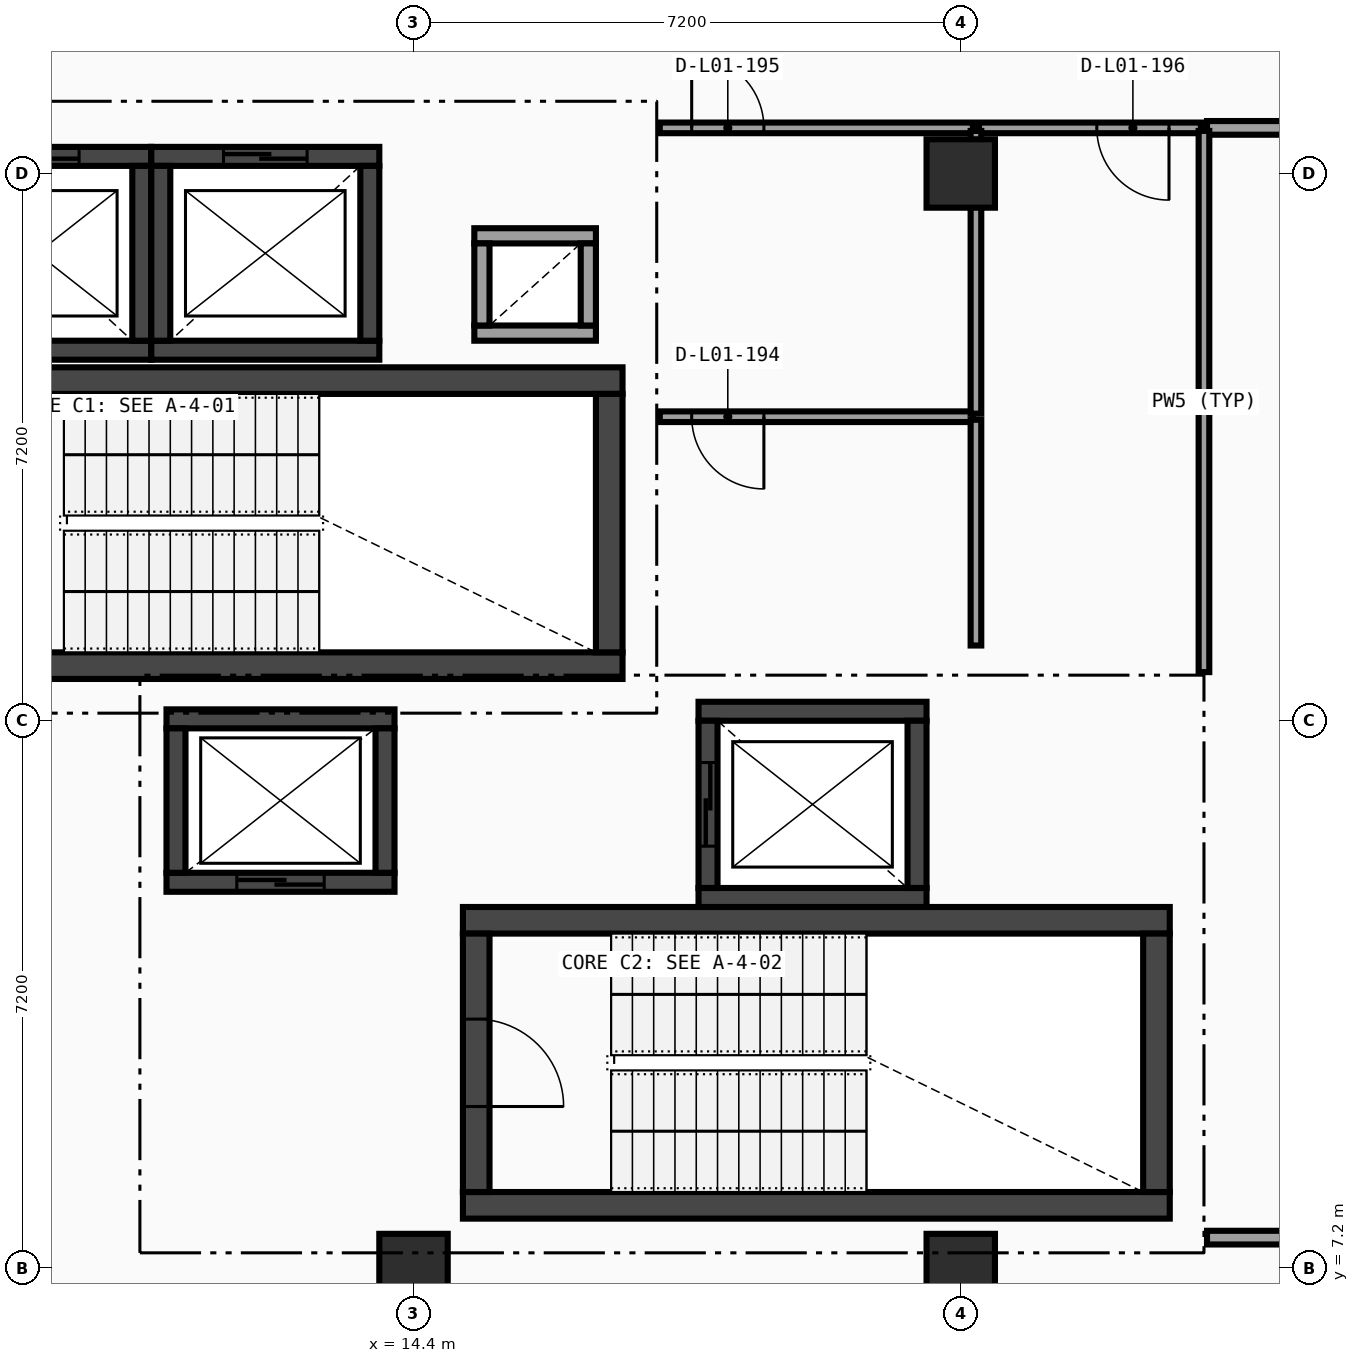
"""IFC4 building model, lengths in metres.
Left out: names, types, materials, properties, quantities, classifications, styles, units other than length and angle.
Written with IfcOpenShell. Run it as: python <this file> out.ifc"""

import sys

from ifc_helpers import new_model, si_unit, direction, frame, frame_2d, origin, origin_2d, place, context, subcontext, project, spatial, rectangle, extrude, element, fill, save


model = new_model("IFC4")
c1 = context("Model", 3, precision=1e-05, world=origin(), true_north=direction((0.0, 1.0)))
c2 = subcontext(c1, "Body", "Model", "MODEL_VIEW")
j1 = project(units=[si_unit("LENGTHUNIT", "METRE"), si_unit("PLANEANGLEUNIT", "RADIAN")], contexts=[c1])
p1 = place(None, origin())
s1 = spatial("IfcSite", under=j1, at=p1, CompositionType="ELEMENT")
p2 = place(p1, origin())
s2 = spatial("IfcBuilding", under=s1, at=p2, CompositionType="ELEMENT")
p3 = place(p2, frame((0.0, 0.0, 5.4)))
s3 = spatial("IfcBuildingStorey", under=s2, at=p3, CompositionType="ELEMENT", Elevation=5.4)
for number, where, z_axis, x_axis in (
    (1, (14.4, 7.2, 0.0), (0.0, 0.0, 1.0), (1.0, 0.0, 0.0)),
    (2, (21.6, 7.2, 0.0), (0.0, 0.0, 1.0), (1.0, 0.0, 0.0)),
    (3, (21.6, 21.6, 0.0), (0.0, 0.0, 1.0), (1.0, 0.0, 0.0)),
):
    element("IfcColumn", number, at=place(p3, frame(where, z_axis=z_axis, x_axis=x_axis)), inside=s3, PredefinedType="COLUMN", context=c2, shape_type="SweptSolid", body=[
        extrude(rectangle(XDim=0.9, YDim=0.9, at=origin_2d()), origin(), (0.0, 0.0, 1.0), 4.8),
    ])
for number, where, z_axis, x_axis in (
    (4, (7.85, 15.125, 0.0), (0.0, 0.0, 1.0), (1.0, 0.0, 0.0)),
    (5, (17.15, 18.875, 0.0), (0.0, 0.0, 1.0), (-1.0, 0.0, 0.0)),
):
    element("IfcWall", number, at=place(p3, frame(where, z_axis=z_axis, x_axis=x_axis)), inside=s3, PredefinedType="SHEAR", context=c2, shape_type="SweptSolid", body=[
        extrude(rectangle(XDim=9.3, YDim=0.35, at=frame_2d((4.65, 0.0))), origin(), (0.0, 0.0, 1.0), 4.52),
    ])
p4 = place(p3, frame((16.975, 15.3, 0.0), z_axis=(0.0, 0.0, 1.0), x_axis=(0.0, 1.0, 0.0)))
e6 = element("IfcWall", 6, at=p4, inside=s3, PredefinedType="SHEAR", context=c2, shape_type="SweptSolid", body=[
    extrude(rectangle(XDim=3.4, YDim=0.35, at=frame_2d((1.7, 0.0))), origin(), (0.0, 0.0, 1.0), 4.52),
])
p5 = place(p3, frame((7.95, 19.275, 0.0), z_axis=(0.0, 0.0, 1.0), x_axis=(1.0, 0.0, 0.0)))
e7 = element("IfcWall", 7, at=p5, inside=s3, PredefinedType="SHEAR", context=c2, shape_type="SweptSolid", body=[
    extrude(rectangle(XDim=3.0, YDim=0.25, at=frame_2d((1.5, 0.0))), origin(), (0.0, 0.0, 1.0), 4.52),
])
p6 = place(p3, frame((10.95, 21.825, 0.0), z_axis=(0.0, 0.0, 1.0), x_axis=(-1.0, 0.0, 0.0)))
e8 = element("IfcWall", 8, at=p6, inside=s3, PredefinedType="SHEAR", context=c2, shape_type="SweptSolid", body=[
    extrude(rectangle(XDim=3.0, YDim=0.25, at=frame_2d((1.5, 0.0))), origin(), (0.0, 0.0, 1.0), 4.52),
])
p7 = place(p6, frame((0.95, 0.0, 0.0)))
e9 = element("IfcOpeningElement", 9, at=p7, cuts=e8, PredefinedType="OPENING", context=c2, shape_type="SweptSolid", body=[
    extrude(rectangle(XDim=1.1, YDim=2.1, at=frame_2d((0.55, 1.05))), frame((0.0, 0.135, 0.0), z_axis=(0.0, -1.0, 0.0), x_axis=(1.0, 0.0, 0.0)), (0.0, 0.0, 1.0), 0.27),
])
p8 = place(p3, frame((10.825, 19.4, 0.0), z_axis=(0.0, 0.0, 1.0), x_axis=(0.0, 1.0, 0.0)))
e10 = element("IfcWall", 10, at=p8, inside=s3, PredefinedType="SHEAR", context=c2, shape_type="SweptSolid", body=[
    extrude(rectangle(XDim=2.3, YDim=0.25, at=frame_2d((1.15, 0.0))), origin(), (0.0, 0.0, 1.0), 4.52),
])
p9 = place(p3, frame((10.95, 19.275, 0.0), z_axis=(0.0, 0.0, 1.0), x_axis=(1.0, 0.0, 0.0)))
e11 = element("IfcWall", 11, at=p9, inside=s3, PredefinedType="SHEAR", context=c2, shape_type="SweptSolid", body=[
    extrude(rectangle(XDim=3.0, YDim=0.25, at=frame_2d((1.5, 0.0))), origin(), (0.0, 0.0, 1.0), 4.52),
])
p10 = place(p3, frame((13.95, 21.825, 0.0), z_axis=(0.0, 0.0, 1.0), x_axis=(-1.0, 0.0, 0.0)))
e12 = element("IfcWall", 12, at=p10, inside=s3, PredefinedType="SHEAR", context=c2, shape_type="SweptSolid", body=[
    extrude(rectangle(XDim=3.0, YDim=0.25, at=frame_2d((1.5, 0.0))), origin(), (0.0, 0.0, 1.0), 4.52),
])
p11 = place(p10, frame((0.95, 0.0, 0.0)))
e13 = element("IfcOpeningElement", 13, at=p11, cuts=e12, PredefinedType="OPENING", context=c2, shape_type="SweptSolid", body=[
    extrude(rectangle(XDim=1.1, YDim=2.1, at=frame_2d((0.55, 1.05))), frame((0.0, 0.135, 0.0), z_axis=(0.0, -1.0, 0.0), x_axis=(1.0, 0.0, 0.0)), (0.0, 0.0, 1.0), 0.27),
])
for number, where, z_axis, x_axis in (
    (14, (11.075, 21.7, 0.0), (0.0, 0.0, 1.0), (0.0, -1.0, 0.0)),
    (15, (13.825, 19.4, 0.0), (0.0, 0.0, 1.0), (0.0, 1.0, 0.0)),
):
    element("IfcWall", number, at=place(p3, frame(where, z_axis=z_axis, x_axis=x_axis)), inside=s3, PredefinedType="SHEAR", context=c2, shape_type="SweptSolid", body=[
        extrude(rectangle(XDim=2.3, YDim=0.25, at=frame_2d((1.15, 0.0))), origin(), (0.0, 0.0, 1.0), 4.52),
    ])
for number, where, z_axis, x_axis in (
    (16, (15.05, 8.025, 0.0), (0.0, 0.0, 1.0), (1.0, 0.0, 0.0)),
    (17, (24.35, 11.775, 0.0), (0.0, 0.0, 1.0), (-1.0, 0.0, 0.0)),
):
    element("IfcWall", number, at=place(p3, frame(where, z_axis=z_axis, x_axis=x_axis)), inside=s3, PredefinedType="SHEAR", context=c2, shape_type="SweptSolid", body=[
        extrude(rectangle(XDim=9.3, YDim=0.35, at=frame_2d((4.65, 0.0))), origin(), (0.0, 0.0, 1.0), 4.52),
    ])
p12 = place(p3, frame((15.225, 11.6, 0.0), z_axis=(0.0, 0.0, 1.0), x_axis=(0.0, -1.0, 0.0)))
e18 = element("IfcWall", 18, at=p12, inside=s3, PredefinedType="SHEAR", context=c2, shape_type="SweptSolid", body=[
    extrude(rectangle(XDim=3.4, YDim=0.35, at=frame_2d((1.7, 0.0))), origin(), (0.0, 0.0, 1.0), 4.52),
])
p13 = place(p12, frame((1.125, 0.0, 0.0)))
e19 = element("IfcOpeningElement", 19, at=p13, cuts=e18, PredefinedType="OPENING", context=c2, shape_type="SweptSolid", body=[
    extrude(rectangle(XDim=1.15, YDim=2.1, at=frame_2d((0.575, 1.05))), frame((0.0, 0.185, 0.0), z_axis=(0.0, -1.0, 0.0), x_axis=(1.0, 0.0, 0.0)), (0.0, 0.0, 1.0), 0.37),
])
p14 = place(p3, frame((24.175, 8.2, 0.0), z_axis=(0.0, 0.0, 1.0), x_axis=(0.0, 1.0, 0.0)))
e20 = element("IfcWall", 20, at=p14, inside=s3, PredefinedType="SHEAR", context=c2, shape_type="SweptSolid", body=[
    extrude(rectangle(XDim=3.4, YDim=0.35, at=frame_2d((1.7, 0.0))), origin(), (0.0, 0.0, 1.0), 4.52),
])
p15 = place(p3, frame((11.15, 12.275, 0.0), z_axis=(0.0, 0.0, 1.0), x_axis=(1.0, 0.0, 0.0)))
e21 = element("IfcWall", 21, at=p15, inside=s3, PredefinedType="SHEAR", context=c2, shape_type="SweptSolid", body=[
    extrude(rectangle(XDim=3.0, YDim=0.25, at=frame_2d((1.5, 0.0))), origin(), (0.0, 0.0, 1.0), 4.52),
])
p16 = place(p15, frame((0.925, 0.0, 0.0)))
e22 = element("IfcOpeningElement", 22, at=p16, cuts=e21, PredefinedType="OPENING", context=c2, shape_type="SweptSolid", body=[
    extrude(rectangle(XDim=1.15, YDim=2.1, at=frame_2d((0.575, 1.05))), frame((0.0, 0.135, 0.0), z_axis=(0.0, -1.0, 0.0), x_axis=(1.0, 0.0, 0.0)), (0.0, 0.0, 1.0), 0.27),
])
p17 = place(p3, frame((14.15, 14.425, 0.0), z_axis=(0.0, 0.0, 1.0), x_axis=(-1.0, 0.0, 0.0)))
e23 = element("IfcWall", 23, at=p17, inside=s3, PredefinedType="SHEAR", context=c2, shape_type="SweptSolid", body=[
    extrude(rectangle(XDim=3.0, YDim=0.25, at=frame_2d((1.5, 0.0))), origin(), (0.0, 0.0, 1.0), 4.52),
])
for number, where, z_axis, x_axis in (
    (24, (11.275, 14.3, 0.0), (0.0, 0.0, 1.0), (0.0, -1.0, 0.0)),
    (25, (14.025, 12.4, 0.0), (0.0, 0.0, 1.0), (0.0, 1.0, 0.0)),
):
    element("IfcWall", number, at=place(p3, frame(where, z_axis=z_axis, x_axis=x_axis)), inside=s3, PredefinedType="SHEAR", context=c2, shape_type="SweptSolid", body=[
        extrude(rectangle(XDim=1.9, YDim=0.25, at=frame_2d((0.95, 0.0))), origin(), (0.0, 0.0, 1.0), 4.52),
    ])
for number, where, z_axis, x_axis in (
    (26, (18.15, 12.075, 0.0), (0.0, 0.0, 1.0), (1.0, 0.0, 0.0)),
    (27, (21.15, 14.525, 0.0), (0.0, 0.0, 1.0), (-1.0, 0.0, 0.0)),
):
    element("IfcWall", number, at=place(p3, frame(where, z_axis=z_axis, x_axis=x_axis)), inside=s3, PredefinedType="SHEAR", context=c2, shape_type="SweptSolid", body=[
        extrude(rectangle(XDim=3.0, YDim=0.25, at=frame_2d((1.5, 0.0))), origin(), (0.0, 0.0, 1.0), 4.52),
    ])
p18 = place(p3, frame((18.275, 14.4, 0.0), z_axis=(0.0, 0.0, 1.0), x_axis=(0.0, -1.0, 0.0)))
e28 = element("IfcWall", 28, at=p18, inside=s3, PredefinedType="SHEAR", context=c2, shape_type="SweptSolid", body=[
    extrude(rectangle(XDim=2.2, YDim=0.25, at=frame_2d((1.1, 0.0))), origin(), (0.0, 0.0, 1.0), 4.52),
])
p19 = place(p18, frame((0.55, 0.0, 0.0)))
e29 = element("IfcOpeningElement", 29, at=p19, cuts=e28, PredefinedType="OPENING", context=c2, shape_type="SweptSolid", body=[
    extrude(rectangle(XDim=1.1, YDim=2.1, at=frame_2d((0.55, 1.05))), frame((0.0, 0.135, 0.0), z_axis=(0.0, -1.0, 0.0), x_axis=(1.0, 0.0, 0.0)), (0.0, 0.0, 1.0), 0.27),
])
p20 = place(p3, frame((21.025, 12.2, 0.0), z_axis=(0.0, 0.0, 1.0), x_axis=(0.0, 1.0, 0.0)))
e30 = element("IfcWall", 30, at=p20, inside=s3, PredefinedType="SHEAR", context=c2, shape_type="SweptSolid", body=[
    extrude(rectangle(XDim=2.2, YDim=0.25, at=frame_2d((1.1, 0.0))), origin(), (0.0, 0.0, 1.0), 4.52),
])
for number, where, z_axis, x_axis in (
    (31, (15.2, 19.5, 0.0), (0.0, 0.0, 1.0), (1.0, 0.0, 0.0)),
    (32, (16.8, 20.78, 0.0), (0.0, 0.0, 1.0), (-1.0, 0.0, 0.0)),
):
    element("IfcWall", number, at=place(p3, frame(where, z_axis=z_axis, x_axis=x_axis)), inside=s3, PredefinedType="SOLIDWALL", context=c2, shape_type="SweptSolid", body=[
        extrude(rectangle(XDim=1.6, YDim=0.2, at=frame_2d((0.8, 0.0))), origin(), (0.0, 0.0, 1.0), 4.52),
    ])
for number, where, z_axis, x_axis in (
    (33, (15.3, 20.68, 0.0), (0.0, 0.0, 1.0), (0.0, -1.0, 0.0)),
    (34, (16.7, 19.6, 0.0), (0.0, 0.0, 1.0), (0.0, 1.0, 0.0)),
):
    element("IfcWall", number, at=place(p3, frame(where, z_axis=z_axis, x_axis=x_axis)), inside=s3, PredefinedType="SOLIDWALL", context=c2, shape_type="SweptSolid", body=[
        extrude(rectangle(XDim=1.08, YDim=0.2, at=frame_2d((0.54, 0.0))), origin(), (0.0, 0.0, 1.0), 4.52),
    ])
p21 = place(p3, frame((24.84, 22.2, 0.0), z_axis=(0.0, 0.0, 1.0), x_axis=(1.0, 0.0, 0.0)))
e35 = element("IfcWall", 35, at=p21, inside=s3, PredefinedType="PARTITIONING", context=c2, shape_type="SweptSolid", body=[
    extrude(rectangle(XDim=10.22, YDim=0.18, at=frame_2d((5.11, 0.0))), origin(), (0.0, 0.0, 1.0), 3.801),
])
p22 = place(p3, frame((17.64, 22.2, 0.0), z_axis=(0.0, 0.0, 1.0), x_axis=(1.0, 0.0, 0.0)))
e36 = element("IfcWall", 36, at=p22, inside=s3, PredefinedType="PARTITIONING", context=c2, shape_type="SweptSolid", body=[
    extrude(rectangle(XDim=4.12, YDim=0.14, at=frame_2d((2.06, 0.0))), origin(), (0.0, 0.0, 1.0), 3.801),
])
p23 = place(p22, frame((0.42, 0.0, 0.0)))
e37 = element("IfcOpeningElement", 37, at=p23, cuts=e36, PredefinedType="OPENING", context=c2, shape_type="SweptSolid", body=[
    extrude(rectangle(XDim=0.95, YDim=2.08, at=frame_2d((0.475, 1.04))), frame((0.0, 0.08, 0.0), z_axis=(0.0, -1.0, 0.0), x_axis=(1.0, 0.0, 0.0)), (0.0, 0.0, 1.0), 0.16),
])
p24 = place(p3, frame((21.84, 22.2, 0.0), z_axis=(0.0, 0.0, 1.0), x_axis=(1.0, 0.0, 0.0)))
e38 = element("IfcWall", 38, at=p24, inside=s3, PredefinedType="PARTITIONING", context=c2, shape_type="SweptSolid", body=[
    extrude(rectangle(XDim=2.92, YDim=0.14, at=frame_2d((1.46, 0.0))), origin(), (0.0, 0.0, 1.0), 4.52),
])
p25 = place(p24, frame((1.55, 0.0, 0.0)))
e39 = element("IfcOpeningElement", 39, at=p25, cuts=e38, PredefinedType="OPENING", context=c2, shape_type="SweptSolid", body=[
    extrude(rectangle(XDim=0.95, YDim=2.08, at=frame_2d((0.475, 1.04))), frame((0.0, 0.08, 0.0), z_axis=(0.0, -1.0, 0.0), x_axis=(1.0, 0.0, 0.0)), (0.0, 0.0, 1.0), 0.16),
])
p26 = place(p3, frame((24.84, 7.6, 0.0), z_axis=(0.0, 0.0, 1.0), x_axis=(1.0, 0.0, 0.0)))
e40 = element("IfcWall", 40, at=p26, inside=s3, PredefinedType="PARTITIONING", context=c2, shape_type="SweptSolid", body=[
    extrude(rectangle(XDim=10.22, YDim=0.18, at=frame_2d((5.11, 0.0))), origin(), (0.0, 0.0, 1.0), 3.801),
])
p27 = place(p26, frame((6.705, 0.0, 0.0)))
e41 = element("IfcOpeningElement", 41, at=p27, cuts=e40, PredefinedType="OPENING", context=c2, shape_type="SweptSolid", body=[
    extrude(rectangle(XDim=1.0, YDim=2.1, at=frame_2d((0.5, 1.05))), frame((0.0, 0.1, 0.0), z_axis=(0.0, -1.0, 0.0), x_axis=(1.0, 0.0, 0.0)), (0.0, 0.0, 1.0), 0.2),
])
p28 = place(p3, frame((24.8, 15.04, 0.0), z_axis=(0.0, 0.0, 1.0), x_axis=(0.0, 1.0, 0.0)))
e42 = element("IfcWall", 42, at=p28, inside=s3, PredefinedType="PARTITIONING", context=c2, shape_type="SweptSolid", body=[
    extrude(rectangle(XDim=7.12, YDim=0.14, at=frame_2d((3.56, 0.0))), origin(), (0.0, 0.0, 1.0), 3.889),
])
p29 = place(p3, frame((17.64, 18.4, 0.0), z_axis=(0.0, 0.0, 1.0), x_axis=(1.0, 0.0, 0.0)))
e43 = element("IfcWall", 43, at=p29, inside=s3, PredefinedType="PARTITIONING", context=c2, shape_type="SweptSolid", body=[
    extrude(rectangle(XDim=4.12, YDim=0.14, at=frame_2d((2.06, 0.0))), origin(), (0.0, 0.0, 1.0), 4.52),
])
p30 = place(p29, frame((0.42, 0.0, 0.0)))
e44 = element("IfcOpeningElement", 44, at=p30, cuts=e43, PredefinedType="OPENING", context=c2, shape_type="SweptSolid", body=[
    extrude(rectangle(XDim=0.95, YDim=2.08, at=frame_2d((0.475, 1.04))), frame((0.0, 0.08, 0.0), z_axis=(0.0, -1.0, 0.0), x_axis=(1.0, 0.0, 0.0)), (0.0, 0.0, 1.0), 0.16),
])
p31 = place(p3, frame((21.8, 15.39, 0.0), z_axis=(0.0, 0.0, 1.0), x_axis=(0.0, 1.0, 0.0)))
e45 = element("IfcWall", 45, at=p31, inside=s3, PredefinedType="PARTITIONING", context=c2, shape_type="SweptSolid", body=[
    extrude(rectangle(XDim=2.97, YDim=0.14, at=frame_2d((1.485, 0.0))), origin(), (0.0, 0.0, 1.0), 4.52),
])
p32 = place(p3, frame((21.8, 18.44, 0.0), z_axis=(0.0, 0.0, 1.0), x_axis=(0.0, 1.0, 0.0)))
e46 = element("IfcWall", 46, at=p32, inside=s3, PredefinedType="PARTITIONING", context=c2, shape_type="SweptSolid", body=[
    extrude(rectangle(XDim=3.72, YDim=0.14, at=frame_2d((1.86, 0.0))), origin(), (0.0, 0.0, 1.0), 3.801),
])
p33 = place(p7, origin())
e47 = element("IfcDoor", 47, at=p33, inside=s3, OperationType="SLIDING_TO_LEFT", PredefinedType="DOOR", context=c2, shape_type="SweptSolid", body=[
    extrude(rectangle(XDim=1.1, YDim=2.1, at=frame_2d((0.55, 1.05))), frame((0.0, 0.025, 0.0), z_axis=(0.0, -1.0, 0.0), x_axis=(1.0, 0.0, 0.0)), (0.0, 0.0, 1.0), 0.05),
])
fill(e9, e47)
p34 = place(p11, origin())
e48 = element("IfcDoor", 48, at=p34, inside=s3, OperationType="SLIDING_TO_LEFT", PredefinedType="DOOR", context=c2, shape_type="SweptSolid", body=[
    extrude(rectangle(XDim=1.1, YDim=2.1, at=frame_2d((0.55, 1.05))), frame((0.0, 0.025, 0.0), z_axis=(0.0, -1.0, 0.0), x_axis=(1.0, 0.0, 0.0)), (0.0, 0.0, 1.0), 0.05),
])
fill(e13, e48)
p35 = place(p13, frame((1.15, 0.0, 0.0), z_axis=(0.0, 0.0, 1.0), x_axis=(-1.0, 0.0, 0.0)))
e49 = element("IfcDoor", 49, at=p35, inside=s3, OperationType="SINGLE_SWING_LEFT", PredefinedType="DOOR", context=c2, shape_type="SweptSolid", body=[
    extrude(rectangle(XDim=1.15, YDim=2.1, at=frame_2d((0.575, 1.05))), frame((0.0, 0.025, 0.0), z_axis=(0.0, -1.0, 0.0), x_axis=(1.0, 0.0, 0.0)), (0.0, 0.0, 1.0), 0.05),
])
fill(e19, e49)
p36 = place(p16, origin())
e50 = element("IfcDoor", 50, at=p36, inside=s3, OperationType="SLIDING_TO_RIGHT", PredefinedType="DOOR", context=c2, shape_type="SweptSolid", body=[
    extrude(rectangle(XDim=1.15, YDim=2.1, at=frame_2d((0.575, 1.05))), frame((0.0, 0.025, 0.0), z_axis=(0.0, -1.0, 0.0), x_axis=(1.0, 0.0, 0.0)), (0.0, 0.0, 1.0), 0.05),
])
fill(e22, e50)
p37 = place(p19, origin())
e51 = element("IfcDoor", 51, at=p37, inside=s3, OperationType="SLIDING_TO_LEFT", PredefinedType="DOOR", context=c2, shape_type="SweptSolid", body=[
    extrude(rectangle(XDim=1.1, YDim=2.1, at=frame_2d((0.55, 1.05))), frame((0.0, 0.025, 0.0), z_axis=(0.0, -1.0, 0.0), x_axis=(1.0, 0.0, 0.0)), (0.0, 0.0, 1.0), 0.05),
])
fill(e29, e51)
p38 = place(p30, origin())
e52 = element("IfcDoor", 52, at=p38, inside=s3, OperationType="SINGLE_SWING_RIGHT", PredefinedType="DOOR", context=c2, shape_type="SweptSolid", body=[
    extrude(rectangle(XDim=0.95, YDim=2.08, at=frame_2d((0.475, 1.04))), frame((0.0, 0.025, 0.0), z_axis=(0.0, -1.0, 0.0), x_axis=(1.0, 0.0, 0.0)), (0.0, 0.0, 1.0), 0.05),
])
fill(e44, e52)
p39 = place(p23, origin())
e53 = element("IfcDoor", 53, at=p39, inside=s3, OperationType="SINGLE_SWING_LEFT", PredefinedType="DOOR", context=c2, shape_type="SweptSolid", body=[
    extrude(rectangle(XDim=0.95, YDim=2.08, at=frame_2d((0.475, 1.04))), frame((0.0, 0.025, 0.0), z_axis=(0.0, -1.0, 0.0), x_axis=(1.0, 0.0, 0.0)), (0.0, 0.0, 1.0), 0.05),
])
fill(e37, e53)
p40 = place(p25, origin())
e54 = element("IfcDoor", 54, at=p40, inside=s3, OperationType="SINGLE_SWING_RIGHT", PredefinedType="DOOR", context=c2, shape_type="SweptSolid", body=[
    extrude(rectangle(XDim=0.95, YDim=2.08, at=frame_2d((0.475, 1.04))), frame((0.0, 0.025, 0.0), z_axis=(0.0, -1.0, 0.0), x_axis=(1.0, 0.0, 0.0)), (0.0, 0.0, 1.0), 0.05),
])
fill(e39, e54)
save(model, sys.argv[1])
